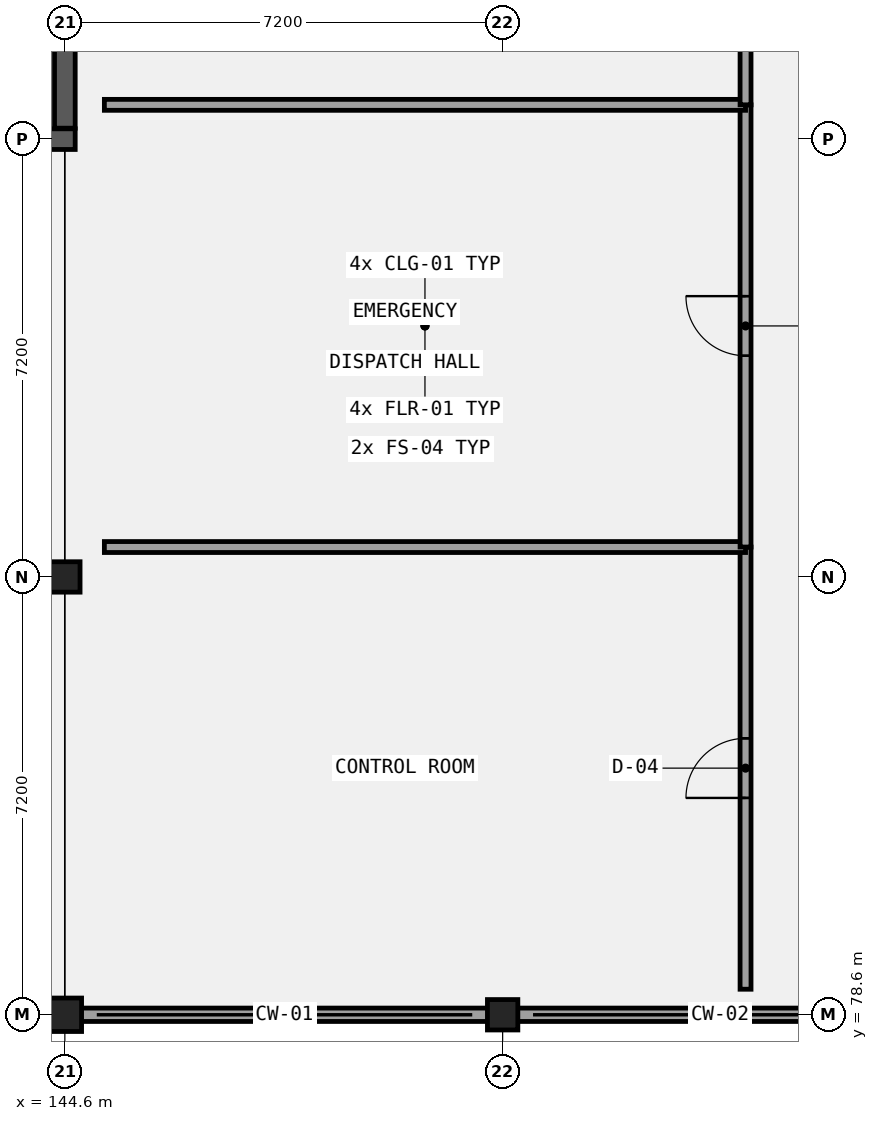
"""IFC4 building model, lengths in metres.
Left out: names, types, materials, properties, quantities, classifications, styles, units other than length and angle.
Written with IfcOpenShell. Run it as: python <this file> out.ifc"""

import sys

from ifc_helpers import new_model, si_unit, direction, frame, frame_2d, origin, origin_2d, place, context, subcontext, project, spatial, rectangle, extrude, element, fill, save


model = new_model("IFC4")
c1 = context("Model", 3, precision=1e-05, world=origin(), true_north=direction((0.0, 1.0)))
c2 = subcontext(c1, "Body", "Model", "MODEL_VIEW")
j1 = project(units=[si_unit("LENGTHUNIT", "METRE"), si_unit("PLANEANGLEUNIT", "RADIAN")], contexts=[c1])
p1 = place(None, origin())
s1 = spatial("IfcSite", under=j1, at=p1, CompositionType="ELEMENT")
p2 = place(p1, origin())
s2 = spatial("IfcBuilding", under=s1, at=p2, CompositionType="ELEMENT")
p3 = place(p2, frame((0.0, 0.0, 26.4)))
s3 = spatial("IfcBuildingStorey", under=s2, at=p3, CompositionType="ELEMENT", Elevation=26.4)
p4 = place(p3, frame((130.03, 93.0, 0.0), z_axis=(0.0, 0.0, 1.0), x_axis=(1.0, 0.0, 0.0)))
e1 = element("IfcWall", 1, at=p4, inside=s3, PredefinedType="SHEAR", context=c2, shape_type="SweptSolid", body=[
    extrude(rectangle(XDim=14.74, YDim=0.34, at=frame_2d((7.37, 0.0))), origin(), (0.0, 0.0, 1.0), 4.5),
])
p5 = place(p4, frame((3.72, 0.0, 0.0)))
e2 = element("IfcOpeningElement", 2, at=p5, cuts=e1, PredefinedType="OPENING", context=c2, shape_type="SweptSolid", body=[
    extrude(rectangle(XDim=1.3, YDim=2.2, at=frame_2d((0.65, 1.1))), frame((0.0, 0.18, 0.0), z_axis=(0.0, -1.0, 0.0), x_axis=(1.0, 0.0, 0.0)), (0.0, 0.0, 1.0), 0.36),
])
p6 = place(p4, frame((11.72, 0.0, 0.0)))
e3 = element("IfcOpeningElement", 3, at=p6, cuts=e1, PredefinedType="OPENING", context=c2, shape_type="SweptSolid", body=[
    extrude(rectangle(XDim=1.3, YDim=2.2, at=frame_2d((0.65, 1.1))), frame((0.0, 0.18, 0.0), z_axis=(0.0, -1.0, 0.0), x_axis=(1.0, 0.0, 0.0)), (0.0, 0.0, 1.0), 0.36),
])
p7 = place(p3, frame((144.6, 93.18, 0.0), z_axis=(0.0, 0.0, 1.0), x_axis=(0.0, 1.0, 0.0)))
e4 = element("IfcWall", 4, at=p7, inside=s3, PredefinedType="SHEAR", context=c2, shape_type="SweptSolid", body=[
    extrude(rectangle(XDim=6.84, YDim=0.34, at=frame_2d((3.42, 0.0))), origin(), (0.0, 0.0, 1.0), 4.5),
])
p8 = place(p3, frame((144.6, 78.6, 0.0), z_axis=(0.0, 0.0, 1.0), x_axis=(1.0, 0.0, 0.0)))
e5 = element("IfcColumn", 5, at=p8, inside=s3, PredefinedType="COLUMN", context=c2, shape_type="SweptSolid", body=[
    extrude(rectangle(XDim=0.55, YDim=0.55, at=origin_2d()), origin(), (0.0, 0.0, 1.0), 4.5),
])
for number, where, z_axis, x_axis in (
    (6, (144.6, 85.8, 0.0), (0.0, 0.0, 1.0), (1.0, 0.0, 0.0)),
    (7, (151.8, 78.6, 0.0), (0.0, 0.0, 1.0), (1.0, 0.0, 0.0)),
):
    element("IfcColumn", number, at=place(p3, frame(where, z_axis=z_axis, x_axis=x_axis)), inside=s3, PredefinedType="COLUMN", context=c2, shape_type="SweptSolid", body=[
        extrude(rectangle(XDim=0.5, YDim=0.5, at=origin_2d()), origin(), (0.0, 0.0, 1.0), 4.5),
    ])
p9 = place(p3, frame((108.45, 78.6, 0.0), z_axis=(0.0, 0.0, 1.0), x_axis=(1.0, 0.0, 0.0)))
e8 = element("IfcWall", 8, at=p9, inside=s3, PredefinedType="SOLIDWALL", context=c2, shape_type="SweptSolid", body=[
    extrude(rectangle(XDim=36.3, YDim=0.3, at=frame_2d((18.15, 0.0))), origin(), (0.0, 0.0, 1.0), 3.22),
])
p10 = place(p9, frame((2.4, 0.0, 0.95)))
e9 = element("IfcOpeningElement", 9, at=p10, cuts=e8, PredefinedType="OPENING", context=c2, shape_type="SweptSolid", body=[
    extrude(rectangle(XDim=2.7, YDim=1.4, at=frame_2d((1.35, 0.7))), frame((0.0, 0.16, 0.0), z_axis=(0.0, -1.0, 0.0), x_axis=(1.0, 0.0, 0.0)), (0.0, 0.0, 1.0), 0.32),
])
p11 = place(p9, frame((9.6, 0.0, 0.95)))
e10 = element("IfcOpeningElement", 10, at=p11, cuts=e8, PredefinedType="OPENING", context=c2, shape_type="SweptSolid", body=[
    extrude(rectangle(XDim=2.7, YDim=1.65, at=frame_2d((1.35, 0.825))), frame((0.0, 0.16, 0.0), z_axis=(0.0, -1.0, 0.0), x_axis=(1.0, 0.0, 0.0)), (0.0, 0.0, 1.0), 0.32),
])
p12 = place(p9, frame((16.8, 0.0, 0.95)))
e11 = element("IfcOpeningElement", 11, at=p12, cuts=e8, PredefinedType="OPENING", context=c2, shape_type="SweptSolid", body=[
    extrude(rectangle(XDim=2.7, YDim=1.9, at=frame_2d((1.35, 0.95))), frame((0.0, 0.16, 0.0), z_axis=(0.0, -1.0, 0.0), x_axis=(1.0, 0.0, 0.0)), (0.0, 0.0, 1.0), 0.32),
])
p13 = place(p9, frame((23.875, 0.0, 0.95)))
e12 = element("IfcOpeningElement", 12, at=p13, cuts=e8, PredefinedType="OPENING", context=c2, shape_type="SweptSolid", body=[
    extrude(rectangle(XDim=2.95, YDim=1.4, at=frame_2d((1.475, 0.7))), frame((0.0, 0.16, 0.0), z_axis=(0.0, -1.0, 0.0), x_axis=(1.0, 0.0, 0.0)), (0.0, 0.0, 1.0), 0.32),
])
p14 = place(p9, frame((31.075, 0.0, 0.95)))
e13 = element("IfcOpeningElement", 13, at=p14, cuts=e8, PredefinedType="OPENING", context=c2, shape_type="SweptSolid", body=[
    extrude(rectangle(XDim=2.95, YDim=1.65, at=frame_2d((1.475, 0.825))), frame((0.0, 0.16, 0.0), z_axis=(0.0, -1.0, 0.0), x_axis=(1.0, 0.0, 0.0)), (0.0, 0.0, 1.0), 0.32),
])
p15 = place(p3, frame((144.45, 78.6, 0.0), z_axis=(0.0, 0.0, 1.0), x_axis=(1.0, 0.0, 0.0)))
e14 = element("IfcWall", 14, at=p15, inside=s3, PredefinedType="PARAPET", context=c2, shape_type="SweptSolid", body=[
    extrude(rectangle(XDim=23.7, YDim=0.22, at=frame_2d((11.85, 0.0))), origin(), (0.0, 0.0, 1.0), 0.45),
])
p16 = place(p3, frame((155.795, 79.02, 0.0), z_axis=(0.0, 0.0, 1.0), x_axis=(0.0, 1.0, 0.0)))
e15 = element("IfcWall", 15, at=p16, inside=s3, PredefinedType="PARTITIONING", context=c2, shape_type="SweptSolid", body=[
    extrude(rectangle(XDim=7.272, YDim=0.18, at=frame_2d((3.636, 0.0))), origin(), (0.0, 0.0, 1.0), 4.22),
])
p17 = place(p16, frame((3.146, 0.0, 0.0)))
e16 = element("IfcOpeningElement", 16, at=p17, cuts=e15, PredefinedType="OPENING", context=c2, shape_type="SweptSolid", body=[
    extrude(rectangle(XDim=0.98, YDim=2.1, at=frame_2d((0.49, 1.05))), frame((0.0, 0.1, 0.0), z_axis=(0.0, -1.0, 0.0), x_axis=(1.0, 0.0, 0.0)), (0.0, 0.0, 1.0), 0.2),
])
p18 = place(p3, frame((145.25, 86.292, 0.0), z_axis=(0.0, 0.0, 1.0), x_axis=(1.0, 0.0, 0.0)))
e17 = element("IfcWall", 17, at=p18, inside=s3, PredefinedType="PARTITIONING", context=c2, shape_type="SweptSolid", body=[
    extrude(rectangle(XDim=10.545, YDim=0.18, at=frame_2d((5.272, 0.0))), origin(), (0.0, 0.0, 1.0), 4.22),
])
p19 = place(p3, frame((155.795, 86.292, 0.0), z_axis=(0.0, 0.0, 1.0), x_axis=(0.0, 1.0, 0.0)))
e18 = element("IfcWall", 18, at=p19, inside=s3, PredefinedType="PARTITIONING", context=c2, shape_type="SweptSolid", body=[
    extrude(rectangle(XDim=7.272, YDim=0.18, at=frame_2d((3.636, 0.0))), origin(), (0.0, 0.0, 1.0), 4.22),
])
p20 = place(p19, frame((3.146, 0.0, 0.0)))
e19 = element("IfcOpeningElement", 19, at=p20, cuts=e18, PredefinedType="OPENING", context=c2, shape_type="SweptSolid", body=[
    extrude(rectangle(XDim=0.98, YDim=2.22, at=frame_2d((0.49, 1.11))), frame((0.0, 0.1, 0.0), z_axis=(0.0, -1.0, 0.0), x_axis=(1.0, 0.0, 0.0)), (0.0, 0.0, 1.0), 0.2),
])
p21 = place(p3, frame((145.25, 93.564, 0.0), z_axis=(0.0, 0.0, 1.0), x_axis=(1.0, 0.0, 0.0)))
e20 = element("IfcWall", 20, at=p21, inside=s3, PredefinedType="PARTITIONING", context=c2, shape_type="SweptSolid", body=[
    extrude(rectangle(XDim=10.545, YDim=0.18, at=frame_2d((5.272, 0.0))), origin(), (0.0, 0.0, 1.0), 4.22),
])
p22 = place(p3, frame((155.795, 93.564, 0.0), z_axis=(0.0, 0.0, 1.0), x_axis=(0.0, 1.0, 0.0)))
e21 = element("IfcWall", 21, at=p22, inside=s3, PredefinedType="PARTITIONING", context=c2, shape_type="SweptSolid", body=[
    extrude(rectangle(XDim=7.272, YDim=0.18, at=frame_2d((3.636, 0.0))), origin(), (0.0, 0.0, 1.0), 4.22),
])
p23 = place(p22, frame((3.146, 0.0, 0.0)))
e22 = element("IfcOpeningElement", 22, at=p23, cuts=e21, PredefinedType="OPENING", context=c2, shape_type="SweptSolid", body=[
    extrude(rectangle(XDim=0.98, YDim=2.35, at=frame_2d((0.49, 1.175))), frame((0.0, 0.1, 0.0), z_axis=(0.0, -1.0, 0.0), x_axis=(1.0, 0.0, 0.0)), (0.0, 0.0, 1.0), 0.2),
])
p24 = place(p17, frame((0.98, 0.0, 0.0), z_axis=(0.0, 0.0, 1.0), x_axis=(-1.0, 0.0, 0.0)))
e23 = element("IfcDoor", 23, at=p24, inside=s3, OperationType="SINGLE_SWING_LEFT", PredefinedType="DOOR", context=c2, shape_type="SweptSolid", body=[
    extrude(rectangle(XDim=0.98, YDim=2.1, at=frame_2d((0.49, 1.05))), frame((0.0, 0.025, 0.0), z_axis=(0.0, -1.0, 0.0), x_axis=(1.0, 0.0, 0.0)), (0.0, 0.0, 1.0), 0.05),
])
fill(e16, e23)
p25 = place(p20, frame((0.98, 0.0, 0.0), z_axis=(0.0, 0.0, 1.0), x_axis=(-1.0, 0.0, 0.0)))
e24 = element("IfcDoor", 24, at=p25, inside=s3, OperationType="SINGLE_SWING_RIGHT", PredefinedType="DOOR", context=c2, shape_type="SweptSolid", body=[
    extrude(rectangle(XDim=0.98, YDim=2.22, at=frame_2d((0.49, 1.11))), frame((0.0, 0.025, 0.0), z_axis=(0.0, -1.0, 0.0), x_axis=(1.0, 0.0, 0.0)), (0.0, 0.0, 1.0), 0.05),
])
fill(e19, e24)
save(model, sys.argv[1])
